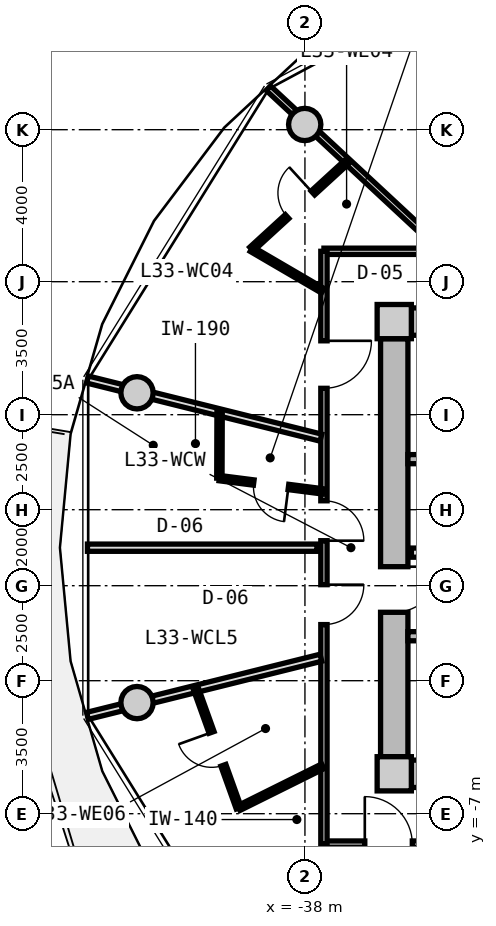
"""IFC4 building model, lengths in metres.
Left out: names, types, materials, properties, quantities, classifications, styles, units other than length and angle.
Written with IfcOpenShell. Run it as: python <this file> out.ifc"""

import sys

from ifc_helpers import new_model, si_unit, direction, frame, frame_2d, origin, origin_2d, place, context, subcontext, project, spatial, rectangle, circle, extrude, source, transform, mapped, element, fill, save


model = new_model("IFC4")
c1 = context("Model", 3, precision=1e-05, world=origin(), true_north=direction((0.0, 1.0)))
c2 = subcontext(c1, "Body", "Model", "MODEL_VIEW")
j1 = project(units=[si_unit("LENGTHUNIT", "METRE"), si_unit("PLANEANGLEUNIT", "RADIAN")], contexts=[c1])
p1 = place(None, origin())
s1 = spatial("IfcSite", under=j1, at=p1, CompositionType="ELEMENT")
p2 = place(p1, origin())
s2 = spatial("IfcBuilding", under=s1, at=p2, CompositionType="ELEMENT")
p3 = place(p2, frame((0.0, 0.0, 108.45)))
s3 = spatial("IfcBuildingStorey", under=s2, at=p3, CompositionType="ELEMENT", Elevation=108.45)
m1 = source(origin(), c2, "Body", "SweptSolid", [
    extrude(rectangle(XDim=0.9, YDim=0.9, at=origin_2d()), origin(), (0.0, 0.0, 1.0), 3.05),
])
for number, where, z_axis, x_axis in (
    (1, (-35.65, -5.95, 0.0), (0.0, 0.0, 1.0), (1.0, 0.0, 0.0)),
    (2, (-35.65, 5.95, 0.0), (0.0, 0.0, 1.0), (1.0, 0.0, 0.0)),
):
    element("IfcColumn", number, at=place(p3, frame(where, z_axis=z_axis, x_axis=x_axis)), inside=s3, PredefinedType="COLUMN", context=c2, shape_type="MappedRepresentation", body=[
        mapped(m1, transform((0.0, 0.0, 0.0), x_axis=(1.0, 0.0, 0.0), y_axis=(0.0, 1.0, 0.0), z_axis=(0.0, 0.0, 1.0), scale=1.0)),
    ])
m2 = source(origin(), c2, "Body", "SweptSolid", [
    extrude(rectangle(XDim=14.4, YDim=0.72, at=frame_2d((7.2, 0.0))), origin(), (0.0, 0.0, 1.0), 2.79),
])
for number, where, z_axis, x_axis in (
    (3, (-35.2, 5.95, 0.0), (0.0, 0.0, 1.0), (1.0, 0.0, 0.0)),
    (4, (-20.8, -5.95, 0.0), (0.0, 0.0, 1.0), (-1.0, 0.0, 0.0)),
):
    element("IfcWall", number, at=place(p3, frame(where, z_axis=z_axis, x_axis=x_axis)), inside=s3, PredefinedType="SHEAR", context=c2, shape_type="MappedRepresentation", body=[
        mapped(m2, transform((0.0, 0.0, 0.0), x_axis=(1.0, 0.0, 0.0), y_axis=(0.0, 1.0, 0.0), z_axis=(0.0, 0.0, 1.0), scale=1.0)),
    ])
m3 = source(origin(), c2, "Body", "SweptSolid", [
    extrude(rectangle(XDim=11.0, YDim=0.72, at=frame_2d((5.5, 0.0))), origin(), (0.0, 0.0, 1.0), 2.79),
])
p4 = place(p3, frame((-35.65, -5.5, 0.0), z_axis=(0.0, 0.0, 1.0), x_axis=(0.0, 1.0, 0.0)))
e5 = element("IfcWall", 5, at=p4, inside=s3, PredefinedType="SHEAR", context=c2, shape_type="MappedRepresentation", body=[
    mapped(m3, transform((0.0, 0.0, 0.0), x_axis=(1.0, 0.0, 0.0), y_axis=(0.0, 1.0, 0.0), z_axis=(0.0, 0.0, 1.0), scale=1.0)),
])
p5 = place(p4, frame((3.8, 0.0, 0.0)))
e6 = element("IfcOpeningElement", 6, at=p5, cuts=e5, PredefinedType="OPENING", context=c2, shape_type="SweptSolid", body=[
    extrude(rectangle(XDim=1.2, YDim=2.15, at=frame_2d((0.6, 1.075))), frame((0.0, 0.37, 0.0), z_axis=(0.0, -1.0, 0.0), x_axis=(1.0, 0.0, 0.0)), (0.0, 0.0, 1.0), 0.74),
])
m4 = source(origin(), c2, "Body", "SweptSolid", [
    extrude(circle(Radius=0.425, at=origin_2d()), origin(), (0.0, 0.0, 1.0), 3.05),
])
for number, where, z_axis, x_axis in (
    (7, (-38.006, 11.137, 0.0), (0.0, 0.0, 1.0), (1.0, 0.0, 0.0)),
    (8, (-42.419, 4.076, 0.0), (0.0, 0.0, 1.0), (1.0, 0.0, 0.0)),
    (9, (-42.419, -4.076, 0.0), (0.0, 0.0, 1.0), (1.0, 0.0, 0.0)),
):
    element("IfcColumn", number, at=place(p3, frame(where, z_axis=z_axis, x_axis=x_axis)), inside=s3, PredefinedType="COLUMN", context=c2, shape_type="MappedRepresentation", body=[
        mapped(m4, transform((0.0, 0.0, 0.0), x_axis=(1.0, 0.0, 0.0), y_axis=(0.0, 1.0, 0.0), z_axis=(0.0, 0.0, 1.0), scale=1.0)),
    ])
m5 = source(origin(), c2, "Body", "SweptSolid", [
    extrude(rectangle(XDim=7.83, YDim=0.24, at=frame_2d((3.915, 0.0))), origin(), (0.0, 0.0, 1.0), 2.79),
])
p6 = place(p3, frame((-35.29, 2.33, 0.0), z_axis=(0.0, 0.0, 1.0), x_axis=(1.0, 0.0, 0.0)))
e10 = element("IfcWall", 10, at=p6, inside=s3, PredefinedType="PARTITIONING", context=c2, shape_type="MappedRepresentation", body=[
    mapped(m5, transform((0.0, 0.0, 0.0), x_axis=(1.0, 0.0, 0.0), y_axis=(0.0, 1.0, 0.0), z_axis=(0.0, 0.0, 1.0), scale=1.0)),
])
p7 = place(p3, frame((-35.29, -2.33, 0.0), z_axis=(0.0, 0.0, 1.0), x_axis=(1.0, 0.0, 0.0)))
e11 = element("IfcWall", 11, at=p7, inside=s3, PredefinedType="PARTITIONING", context=c2, shape_type="MappedRepresentation", body=[
    mapped(m5, transform((0.0, 0.0, 0.0), x_axis=(1.0, 0.0, 0.0), y_axis=(0.0, 1.0, 0.0), z_axis=(0.0, 0.0, 1.0), scale=1.0)),
])
p8 = place(p7, frame((0.95, 0.0, 0.0)))
e12 = element("IfcOpeningElement", 12, at=p8, cuts=e11, PredefinedType="OPENING", context=c2, shape_type="SweptSolid", body=[
    extrude(rectangle(XDim=1.1, YDim=2.15, at=frame_2d((0.55, 1.075))), frame((0.0, 0.13, 0.0), z_axis=(0.0, -1.0, 0.0), x_axis=(1.0, 0.0, 0.0)), (0.0, 0.0, 1.0), 0.26),
])
m6 = source(origin(), c2, "Body", "SweptSolid", [
    extrude(rectangle(XDim=7.62, YDim=0.24, at=frame_2d((3.81, 0.0))), origin(), (0.0, 0.0, 1.0), 2.775),
])
p9 = place(p3, frame((-35.2, -0.13, 0.0), z_axis=(0.0, 0.0, 1.0), x_axis=(1.0, 0.0, 0.0)))
e13 = element("IfcWall", 13, at=p9, inside=s3, PredefinedType="PARTITIONING", context=c2, shape_type="MappedRepresentation", body=[
    mapped(m6, transform((0.0, 0.0, 0.0), x_axis=(1.0, 0.0, 0.0), y_axis=(0.0, 1.0, 0.0), z_axis=(0.0, 0.0, 1.0), scale=1.0)),
])
p10 = place(p9, frame((6.22, 0.0, 0.0)))
e14 = element("IfcOpeningElement", 14, at=p10, cuts=e13, PredefinedType="OPENING", context=c2, shape_type="SweptSolid", body=[
    extrude(rectangle(XDim=1.0, YDim=2.1, at=frame_2d((0.5, 1.05))), frame((0.0, 0.13, 0.0), z_axis=(0.0, -1.0, 0.0), x_axis=(1.0, 0.0, 0.0)), (0.0, 0.0, 1.0), 0.26),
])
p11 = place(p9, frame((2.4, 0.0, 0.0)))
e15 = element("IfcOpeningElement", 15, at=p11, cuts=e13, PredefinedType="OPENING", context=c2, shape_type="SweptSolid", body=[
    extrude(rectangle(XDim=1.0, YDim=2.1, at=frame_2d((0.5, 1.05))), frame((0.0, 0.13, 0.0), z_axis=(0.0, -1.0, 0.0), x_axis=(1.0, 0.0, 0.0)), (0.0, 0.0, 1.0), 0.26),
])
m7 = source(origin(), c2, "Body", "SweptSolid", [
    extrude(rectangle(XDim=8.6, YDim=0.165, at=frame_2d((4.3, 0.0))), origin(), (0.0, 0.0, 1.0), 2.775),
])
p12 = place(p3, frame((-37.5, 7.8, 0.0), z_axis=(0.0, 0.0, 1.0), x_axis=(1.0, 0.0, 0.0)))
e16 = element("IfcWall", 16, at=p12, inside=s3, PredefinedType="PARTITIONING", context=c2, shape_type="MappedRepresentation", body=[
    mapped(m7, transform((0.0, 0.0, 0.0), x_axis=(1.0, 0.0, 0.0), y_axis=(0.0, 1.0, 0.0), z_axis=(0.0, 0.0, 1.0), scale=1.0)),
])
m8 = source(origin(), c2, "Body", "SweptSolid", [
    extrude(rectangle(XDim=9.234, YDim=0.165, at=frame_2d((4.617, 0.0))), origin(), (0.0, 0.0, 1.0), 2.775),
])
p13 = place(p3, frame((-28.266, -7.8, 0.0), z_axis=(0.0, 0.0, 1.0), x_axis=(-1.0, 0.0, 0.0)))
e17 = element("IfcWall", 17, at=p13, inside=s3, PredefinedType="PARTITIONING", context=c2, shape_type="MappedRepresentation", body=[
    mapped(m8, transform((0.0, 0.0, 0.0), x_axis=(1.0, 0.0, 0.0), y_axis=(0.0, 1.0, 0.0), z_axis=(0.0, 0.0, 1.0), scale=1.0)),
])
p14 = place(p13, frame((6.909, 0.0, 0.0)))
e18 = element("IfcOpeningElement", 18, at=p14, cuts=e17, PredefinedType="OPENING", context=c2, shape_type="SweptSolid", body=[
    extrude(rectangle(XDim=1.25, YDim=2.2, at=frame_2d((0.625, 1.1))), frame((0.0, 0.093, 0.0), z_axis=(0.0, -1.0, 0.0), x_axis=(1.0, 0.0, 0.0)), (0.0, 0.0, 1.0), 0.185),
])
p15 = place(p13, frame((4.392, 0.0, 0.0)))
e19 = element("IfcOpeningElement", 19, at=p15, cuts=e17, PredefinedType="OPENING", context=c2, shape_type="SweptSolid", body=[
    extrude(rectangle(XDim=0.92, YDim=2.1, at=frame_2d((0.46, 1.05))), frame((0.0, 0.093, 0.0), z_axis=(0.0, -1.0, 0.0), x_axis=(1.0, 0.0, 0.0)), (0.0, 0.0, 1.0), 0.185),
])
p16 = place(p13, frame((1.408, 0.0, 0.0)))
e20 = element("IfcOpeningElement", 20, at=p16, cuts=e17, PredefinedType="OPENING", context=c2, shape_type="SweptSolid", body=[
    extrude(rectangle(XDim=0.92, YDim=2.1, at=frame_2d((0.46, 1.05))), frame((0.0, 0.093, 0.0), z_axis=(0.0, -1.0, 0.0), x_axis=(1.0, 0.0, 0.0)), (0.0, 0.0, 1.0), 0.185),
])
m9 = source(origin(), c2, "Body", "SweptSolid", [
    extrude(rectangle(XDim=15.6, YDim=0.165, at=frame_2d((7.8, 0.0))), origin(), (0.0, 0.0, 1.0), 2.775),
])
p17 = place(p3, frame((-37.5, -7.8, 0.0), z_axis=(0.0, 0.0, 1.0), x_axis=(0.0, 1.0, 0.0)))
e21 = element("IfcWall", 21, at=p17, inside=s3, PredefinedType="PARTITIONING", context=c2, shape_type="MappedRepresentation", body=[
    mapped(m9, transform((0.0, 0.0, 0.0), x_axis=(1.0, 0.0, 0.0), y_axis=(0.0, 1.0, 0.0), z_axis=(0.0, 0.0, 1.0), scale=1.0)),
])
p18 = place(p17, frame((11.994, 0.0, 0.0)))
e22 = element("IfcOpeningElement", 22, at=p18, cuts=e21, PredefinedType="OPENING", context=c2, shape_type="SweptSolid", body=[
    extrude(rectangle(XDim=1.25, YDim=2.2, at=frame_2d((0.625, 1.1))), frame((0.0, 0.093, 0.0), z_axis=(0.0, -1.0, 0.0), x_axis=(1.0, 0.0, 0.0)), (0.0, 0.0, 1.0), 0.185),
])
p19 = place(p17, frame((7.984, 0.0, 0.0)))
e23 = element("IfcOpeningElement", 23, at=p19, cuts=e21, PredefinedType="OPENING", context=c2, shape_type="SweptSolid", body=[
    extrude(rectangle(XDim=1.05, YDim=2.15, at=frame_2d((0.525, 1.075))), frame((0.0, 0.093, 0.0), z_axis=(0.0, -1.0, 0.0), x_axis=(1.0, 0.0, 0.0)), (0.0, 0.0, 1.0), 0.185),
])
p20 = place(p17, frame((5.777, 0.0, 0.0)))
e24 = element("IfcOpeningElement", 24, at=p20, cuts=e21, PredefinedType="OPENING", context=c2, shape_type="SweptSolid", body=[
    extrude(rectangle(XDim=1.05, YDim=2.15, at=frame_2d((0.525, 1.075))), frame((0.0, 0.093, 0.0), z_axis=(0.0, -1.0, 0.0), x_axis=(1.0, 0.0, 0.0)), (0.0, 0.0, 1.0), 0.185),
])
m10 = source(origin(), c2, "Body", "SweptSolid", [
    extrude(rectangle(XDim=6.187, YDim=0.165, at=frame_2d((3.093, 0.0))), origin(), (0.0, 0.0, 1.0), 2.275),
])
p21 = place(p3, frame((-34.429, 7.88, 0.0), z_axis=(0.0, 0.0, 1.0), x_axis=(-0.732501077882, 0.680765870841, 0.0)))
e25 = element("IfcWall", 25, at=p21, inside=s3, PredefinedType="PARTITIONING", context=c2, shape_type="MappedRepresentation", body=[
    mapped(m10, transform((0.0, 0.0, 0.0), x_axis=(1.0, 0.0, 0.0), y_axis=(0.0, 1.0, 0.0), z_axis=(0.0, 0.0, 1.0), scale=1.0)),
])
m11 = source(origin(), c2, "Body", "SweptSolid", [
    extrude(rectangle(XDim=6.331, YDim=0.19, at=frame_2d((3.165, 0.0))), origin(), (0.0, 0.0, 1.0), 2.275),
])
p22 = place(p3, frame((-37.58, 2.896, 0.0), z_axis=(0.0, 0.0, 1.0), x_axis=(-0.97036440661, 0.241646267062, 0.0)))
e26 = element("IfcWall", 26, at=p22, inside=s3, PredefinedType="PARTITIONING", context=c2, shape_type="MappedRepresentation", body=[
    mapped(m11, transform((0.0, 0.0, 0.0), x_axis=(1.0, 0.0, 0.0), y_axis=(0.0, 1.0, 0.0), z_axis=(0.0, 0.0, 1.0), scale=1.0)),
])
m12 = source(origin(), c2, "Body", "SweptSolid", [
    extrude(rectangle(XDim=2.172, YDim=0.14, at=frame_2d((1.086, 0.0))), origin(), (0.0, 0.0, 1.0), 2.775),
])
p23 = place(p3, frame((-37.53, 6.762, 0.0), z_axis=(0.0, 0.0, 1.0), x_axis=(-0.863562702562, 0.504241468688, 0.0)))
e27 = element("IfcWall", 27, at=p23, inside=s3, PredefinedType="PARTITIONING", context=c2, shape_type="MappedRepresentation", body=[
    mapped(m12, transform((0.0, 0.0, 0.0), x_axis=(1.0, 0.0, 0.0), y_axis=(0.0, 1.0, 0.0), z_axis=(0.0, 0.0, 1.0), scale=1.0)),
])
m13 = source(origin(), c2, "Body", "SweptSolid", [
    extrude(rectangle(XDim=3.457, YDim=0.14, at=frame_2d((1.729, 0.0))), origin(), (0.0, 0.0, 1.0), 2.775),
])
p24 = place(p3, frame((-39.405, 7.857, 0.0), z_axis=(0.0, 0.0, 1.0), x_axis=(0.737567375492, 0.675273549467, 0.0)))
e28 = element("IfcWall", 28, at=p24, inside=s3, PredefinedType="PARTITIONING", context=c2, shape_type="MappedRepresentation", body=[
    mapped(m13, transform((0.0, 0.0, 0.0), x_axis=(1.0, 0.0, 0.0), y_axis=(0.0, 1.0, 0.0), z_axis=(0.0, 0.0, 1.0), scale=1.0)),
])
p25 = place(p24, frame((1.268, 0.0, 0.0)))
e29 = element("IfcOpeningElement", 29, at=p25, cuts=e28, PredefinedType="OPENING", context=c2, shape_type="SweptSolid", body=[
    extrude(rectangle(XDim=0.92, YDim=2.1, at=frame_2d((0.46, 1.05))), frame((0.0, 0.08, 0.0), z_axis=(0.0, -1.0, 0.0), x_axis=(1.0, 0.0, 0.0)), (0.0, 0.0, 1.0), 0.16),
])
p26 = place(p3, frame((-37.58, -2.896, 0.0), z_axis=(0.0, 0.0, 1.0), x_axis=(-0.97036440661, -0.241646267062, 0.0)))
e30 = element("IfcWall", 30, at=p26, inside=s3, PredefinedType="PARTITIONING", context=c2, shape_type="MappedRepresentation", body=[
    mapped(m11, transform((0.0, 0.0, 0.0), x_axis=(1.0, 0.0, 0.0), y_axis=(0.0, 1.0, 0.0), z_axis=(0.0, 0.0, 1.0), scale=1.0)),
])
m14 = source(origin(), c2, "Body", "SweptSolid", [
    extrude(rectangle(XDim=6.039, YDim=0.19, at=frame_2d((3.019, 0.0))), origin(), (0.0, 0.0, 1.0), 2.775),
])
p27 = place(p3, frame((-37.685, 0.0, 0.0), z_axis=(0.0, 0.0, 1.0), x_axis=(-1.0, 0.0, 0.0)))
e31 = element("IfcWall", 31, at=p27, inside=s3, PredefinedType="PARTITIONING", context=c2, shape_type="MappedRepresentation", body=[
    mapped(m14, transform((0.0, 0.0, 0.0), x_axis=(1.0, 0.0, 0.0), y_axis=(0.0, 1.0, 0.0), z_axis=(0.0, 0.0, 1.0), scale=1.0)),
])
m15 = source(origin(), c2, "Body", "SweptSolid", [
    extrude(rectangle(XDim=2.744, YDim=0.14, at=frame_2d((1.372, 0.0))), origin(), (0.0, 0.0, 1.0), 2.775),
])
p28 = place(p3, frame((-37.53, 1.482, 0.0), z_axis=(0.0, 0.0, 1.0), x_axis=(-0.991916450239, 0.126892693823, 0.0)))
e32 = element("IfcWall", 32, at=p28, inside=s3, PredefinedType="PARTITIONING", context=c2, shape_type="MappedRepresentation", body=[
    mapped(m15, transform((0.0, 0.0, 0.0), x_axis=(1.0, 0.0, 0.0), y_axis=(0.0, 1.0, 0.0), z_axis=(0.0, 0.0, 1.0), scale=1.0)),
])
p29 = place(p28, frame((0.912, 0.0, 0.0)))
e33 = element("IfcOpeningElement", 33, at=p29, cuts=e32, PredefinedType="OPENING", context=c2, shape_type="SweptSolid", body=[
    extrude(rectangle(XDim=0.92, YDim=2.1, at=frame_2d((0.46, 1.05))), frame((0.0, 0.08, 0.0), z_axis=(0.0, -1.0, 0.0), x_axis=(1.0, 0.0, 0.0)), (0.0, 0.0, 1.0), 0.16),
])
m16 = source(origin(), c2, "Body", "SweptSolid", [
    extrude(rectangle(XDim=1.749, YDim=0.14, at=frame_2d((0.875, 0.0))), origin(), (0.0, 0.0, 1.0), 2.775),
])
p30 = place(p3, frame((-40.251, 1.831, 0.0), z_axis=(0.0, 0.0, 1.0), x_axis=(0.003350064953, 0.999994388517, 0.0)))
e34 = element("IfcWall", 34, at=p30, inside=s3, PredefinedType="PARTITIONING", context=c2, shape_type="MappedRepresentation", body=[
    mapped(m16, transform((0.0, 0.0, 0.0), x_axis=(1.0, 0.0, 0.0), y_axis=(0.0, 1.0, 0.0), z_axis=(0.0, 0.0, 1.0), scale=1.0)),
])
m17 = source(origin(), c2, "Body", "SweptSolid", [
    extrude(rectangle(XDim=6.187, YDim=0.19, at=frame_2d((3.093, 0.0))), origin(), (0.0, 0.0, 1.0), 2.275),
])
p31 = place(p3, frame((-34.429, -7.88, 0.0), z_axis=(0.0, 0.0, 1.0), x_axis=(-0.732501077882, -0.680765870841, 0.0)))
e35 = element("IfcWall", 35, at=p31, inside=s3, PredefinedType="PARTITIONING", context=c2, shape_type="MappedRepresentation", body=[
    mapped(m17, transform((0.0, 0.0, 0.0), x_axis=(1.0, 0.0, 0.0), y_axis=(0.0, 1.0, 0.0), z_axis=(0.0, 0.0, 1.0), scale=1.0)),
])
m18 = source(origin(), c2, "Body", "SweptSolid", [
    extrude(rectangle(XDim=2.469, YDim=0.14, at=frame_2d((1.235, 0.0))), origin(), (0.0, 0.0, 1.0), 2.775),
])
p32 = place(p3, frame((-37.53, -5.754, 0.0), z_axis=(0.0, 0.0, 1.0), x_axis=(-0.895512172456, -0.445037019789, 0.0)))
e36 = element("IfcWall", 36, at=p32, inside=s3, PredefinedType="PARTITIONING", context=c2, shape_type="MappedRepresentation", body=[
    mapped(m18, transform((0.0, 0.0, 0.0), x_axis=(1.0, 0.0, 0.0), y_axis=(0.0, 1.0, 0.0), z_axis=(0.0, 0.0, 1.0), scale=1.0)),
])
m19 = source(origin(), c2, "Body", "SweptSolid", [
    extrude(rectangle(XDim=3.314, YDim=0.14, at=frame_2d((1.657, 0.0))), origin(), (0.0, 0.0, 1.0), 2.775),
])
p33 = place(p3, frame((-39.741, -6.853, 0.0), z_axis=(0.0, 0.0, 1.0), x_axis=(-0.338067217654, 0.941121966776, 0.0)))
e37 = element("IfcWall", 37, at=p33, inside=s3, PredefinedType="PARTITIONING", context=c2, shape_type="MappedRepresentation", body=[
    mapped(m19, transform((0.0, 0.0, 0.0), x_axis=(1.0, 0.0, 0.0), y_axis=(0.0, 1.0, 0.0), z_axis=(0.0, 0.0, 1.0), scale=1.0)),
])
p34 = place(p33, frame((1.197, 0.0, 0.0)))
e38 = element("IfcOpeningElement", 38, at=p34, cuts=e37, PredefinedType="OPENING", context=c2, shape_type="SweptSolid", body=[
    extrude(rectangle(XDim=0.92, YDim=2.1, at=frame_2d((0.46, 1.05))), frame((0.0, 0.08, 0.0), z_axis=(0.0, -1.0, 0.0), x_axis=(1.0, 0.0, 0.0)), (0.0, 0.0, 1.0), 0.16),
])
m20 = source(origin(), c2, "Body", "SweptSolid", [
    extrude(rectangle(XDim=7.243, YDim=0.14, at=frame_2d((3.621, 0.0))), origin(), (0.0, 0.0, 1.0), 2.775),
])
p35 = place(p3, frame((-31.774, -7.83, 0.0), z_axis=(0.0, 0.0, 1.0), x_axis=(-0.605111472002, -0.796140757939, 0.0)))
e39 = element("IfcWall", 39, at=p35, inside=s3, PredefinedType="PARTITIONING", context=c2, shape_type="MappedRepresentation", body=[
    mapped(m20, transform((0.0, 0.0, 0.0), x_axis=(1.0, 0.0, 0.0), y_axis=(0.0, 1.0, 0.0), z_axis=(0.0, 0.0, 1.0), scale=1.0)),
])
m21 = source(origin(), c2, "Body", "SweptSolid", [
    extrude(rectangle(XDim=1.2, YDim=2.15, at=frame_2d((0.6, 1.075))), frame((0.0, 0.025, 0.0), z_axis=(0.0, -1.0, 0.0), x_axis=(1.0, 0.0, 0.0)), (0.0, 0.0, 1.0), 0.05),
])
p36 = place(p5, frame((1.2, 0.0, 0.0), z_axis=(0.0, 0.0, 1.0), x_axis=(-1.0, 0.0, 0.0)))
e40 = element("IfcDoor", 40, at=p36, inside=s3, OperationType="SINGLE_SWING_LEFT", PredefinedType="DOOR", context=c2, shape_type="MappedRepresentation", body=[
    mapped(m21, transform((0.0, 0.0, 0.0), x_axis=(1.0, 0.0, 0.0), y_axis=(0.0, 1.0, 0.0), z_axis=(0.0, 0.0, 1.0), scale=1.0)),
])
fill(e6, e40)
m22 = source(origin(), c2, "Body", "SweptSolid", [
    extrude(rectangle(XDim=1.25, YDim=2.2, at=frame_2d((0.625, 1.1))), frame((0.0, 0.025, 0.0), z_axis=(0.0, -1.0, 0.0), x_axis=(1.0, 0.0, 0.0)), (0.0, 0.0, 1.0), 0.05),
])
p37 = place(p18, frame((1.25, 0.0, 0.0), z_axis=(0.0, 0.0, 1.0), x_axis=(-1.0, 0.0, 0.0)))
e41 = element("IfcDoor", 41, at=p37, inside=s3, OperationType="SINGLE_SWING_LEFT", PredefinedType="DOOR", context=c2, shape_type="MappedRepresentation", body=[
    mapped(m22, transform((0.0, 0.0, 0.0), x_axis=(1.0, 0.0, 0.0), y_axis=(0.0, 1.0, 0.0), z_axis=(0.0, 0.0, 1.0), scale=1.0)),
])
fill(e22, e41)
m23 = source(origin(), c2, "Body", "SweptSolid", [
    extrude(rectangle(XDim=0.92, YDim=2.1, at=frame_2d((0.46, 1.05))), frame((0.0, 0.025, 0.0), z_axis=(0.0, -1.0, 0.0), x_axis=(1.0, 0.0, 0.0)), (0.0, 0.0, 1.0), 0.05),
])
p38 = place(p25, origin())
e42 = element("IfcDoor", 42, at=p38, inside=s3, OperationType="SINGLE_SWING_RIGHT", PredefinedType="DOOR", context=c2, shape_type="MappedRepresentation", body=[
    mapped(m23, transform((0.0, 0.0, 0.0), x_axis=(1.0, 0.0, 0.0), y_axis=(0.0, 1.0, 0.0), z_axis=(0.0, 0.0, 1.0), scale=1.0)),
])
fill(e29, e42)
m24 = source(origin(), c2, "Body", "SweptSolid", [
    extrude(rectangle(XDim=1.05, YDim=2.15, at=frame_2d((0.525, 1.075))), frame((0.0, 0.025, 0.0), z_axis=(0.0, -1.0, 0.0), x_axis=(1.0, 0.0, 0.0)), (0.0, 0.0, 1.0), 0.05),
])
p39 = place(p19, frame((1.05, 0.0, 0.0), z_axis=(0.0, 0.0, 1.0), x_axis=(-1.0, 0.0, 0.0)))
e43 = element("IfcDoor", 43, at=p39, inside=s3, OperationType="SINGLE_SWING_RIGHT", PredefinedType="DOOR", context=c2, shape_type="MappedRepresentation", body=[
    mapped(m24, transform((0.0, 0.0, 0.0), x_axis=(1.0, 0.0, 0.0), y_axis=(0.0, 1.0, 0.0), z_axis=(0.0, 0.0, 1.0), scale=1.0)),
])
fill(e23, e43)
p40 = place(p29, origin())
e44 = element("IfcDoor", 44, at=p40, inside=s3, OperationType="SINGLE_SWING_LEFT", PredefinedType="DOOR", context=c2, shape_type="MappedRepresentation", body=[
    mapped(m23, transform((0.0, 0.0, 0.0), x_axis=(1.0, 0.0, 0.0), y_axis=(0.0, 1.0, 0.0), z_axis=(0.0, 0.0, 1.0), scale=1.0)),
])
fill(e33, e44)
p41 = place(p20, frame((1.05, 0.0, 0.0), z_axis=(0.0, 0.0, 1.0), x_axis=(-1.0, 0.0, 0.0)))
e45 = element("IfcDoor", 45, at=p41, inside=s3, OperationType="SINGLE_SWING_LEFT", PredefinedType="DOOR", context=c2, shape_type="MappedRepresentation", body=[
    mapped(m24, transform((0.0, 0.0, 0.0), x_axis=(1.0, 0.0, 0.0), y_axis=(0.0, 1.0, 0.0), z_axis=(0.0, 0.0, 1.0), scale=1.0)),
])
fill(e24, e45)
p42 = place(p14, frame((1.25, 0.0, 0.0), z_axis=(0.0, 0.0, 1.0), x_axis=(-1.0, 0.0, 0.0)))
e46 = element("IfcDoor", 46, at=p42, inside=s3, OperationType="SINGLE_SWING_LEFT", PredefinedType="DOOR", context=c2, shape_type="MappedRepresentation", body=[
    mapped(m22, transform((0.0, 0.0, 0.0), x_axis=(1.0, 0.0, 0.0), y_axis=(0.0, 1.0, 0.0), z_axis=(0.0, 0.0, 1.0), scale=1.0)),
])
fill(e18, e46)
p43 = place(p34, origin())
e47 = element("IfcDoor", 47, at=p43, inside=s3, OperationType="SINGLE_SWING_RIGHT", PredefinedType="DOOR", context=c2, shape_type="MappedRepresentation", body=[
    mapped(m23, transform((0.0, 0.0, 0.0), x_axis=(1.0, 0.0, 0.0), y_axis=(0.0, 1.0, 0.0), z_axis=(0.0, 0.0, 1.0), scale=1.0)),
])
fill(e38, e47)
save(model, sys.argv[1])
